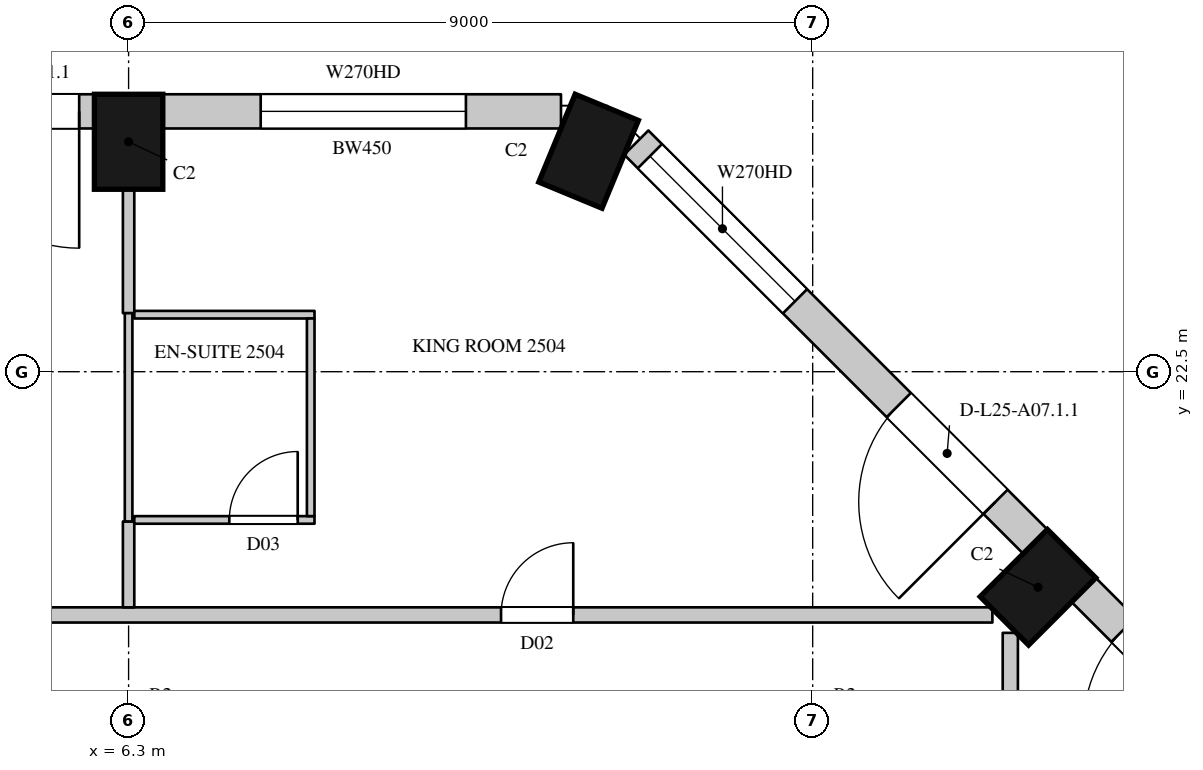
"""IFC4 building model, lengths in metres.
Left out: names, types, materials, properties, quantities, classifications, styles, units other than length and angle.
Written with IfcOpenShell. Run it as: python <this file> out.ifc"""

import sys

from ifc_helpers import new_model, si_unit, direction, frame, frame_2d, origin, origin_2d, place, context, subcontext, project, spatial, rectangle, extrude, element, fill, save


model = new_model("IFC4")
c1 = context("Model", 3, precision=1e-05, world=origin(), true_north=direction((0.0, 1.0)))
c2 = subcontext(c1, "Body", "Model", "MODEL_VIEW")
j1 = project(units=[si_unit("LENGTHUNIT", "METRE"), si_unit("PLANEANGLEUNIT", "RADIAN")], contexts=[c1])
p1 = place(None, origin())
s1 = spatial("IfcSite", under=j1, at=p1, CompositionType="ELEMENT")
p2 = place(p1, origin())
s2 = spatial("IfcBuilding", under=s1, at=p2, CompositionType="ELEMENT")
p3 = place(p2, frame((0.0, 0.0, 120.3)))
s3 = spatial("IfcBuildingStorey", under=s2, at=p3, CompositionType="ELEMENT", Elevation=120.3)
for number, where, z_axis, x_axis in (
    (1, (18.264, 19.664, 0.0), (0.0, 0.0, 1.0), (-0.707, 0.707, 0.0)),
    (2, (12.352, 25.4, 0.0), (0.0, 0.0, 1.0), (-0.924, 0.383, 0.0)),
    (3, (6.3, 25.525, 0.0), (0.0, 0.0, 1.0), (-1.0, 0.0, 0.0)),
):
    element("IfcColumn", number, at=place(p3, frame(where, z_axis=z_axis, x_axis=x_axis)), inside=s3, PredefinedType="COLUMN", context=c2, shape_type="SweptSolid", body=[
        extrude(rectangle(XDim=0.9, YDim=1.25, at=origin_2d()), origin(), (0.0, 0.0, 1.0), 3.6),
    ])
p4 = place(p3, frame((24.115, 14.379, 0.0), z_axis=(0.0, 0.0, 1.0), x_axis=(-0.707106781187, 0.707106781187, 0.0)))
e4 = element("IfcWall", 4, at=p4, inside=s3, PredefinedType="SOLIDWALL", context=c2, shape_type="SweptSolid", body=[
    extrude(rectangle(XDim=7.424, YDim=0.45, at=frame_2d((3.712, 0.0))), origin(), (0.0, 0.0, 1.0), 3.3),
])
p5 = place(p4, frame((0.253, 0.0, 1.05)))
e5 = element("IfcOpeningElement", 5, at=p5, cuts=e4, PredefinedType="OPENING", context=c2, shape_type="SweptSolid", body=[
    extrude(rectangle(XDim=2.7, YDim=2.0, at=frame_2d((1.35, 1.0))), frame((0.0, 0.235, 0.0), z_axis=(0.0, -1.0, 0.0), x_axis=(1.0, 0.0, 0.0)), (0.0, 0.0, 1.0), 0.47),
])
p6 = place(p4, frame((4.884, 0.0, 0.0)))
e6 = element("IfcOpeningElement", 6, at=p6, cuts=e4, PredefinedType="OPENING", context=c2, shape_type="SweptSolid", body=[
    extrude(rectangle(XDim=1.8, YDim=2.4, at=frame_2d((0.9, 1.2))), frame((0.0, 0.235, 0.0), z_axis=(0.0, -1.0, 0.0), x_axis=(1.0, 0.0, 0.0)), (0.0, 0.0, 1.0), 0.47),
])
p7 = place(p3, frame((18.229, 20.265, 0.0), z_axis=(0.0, 0.0, 1.0), x_axis=(-0.707106781187, 0.707106781187, 0.0)))
e7 = element("IfcWall", 7, at=p7, inside=s3, PredefinedType="SOLIDWALL", context=c2, shape_type="SweptSolid", body=[
    extrude(rectangle(XDim=7.424, YDim=0.45, at=frame_2d((3.712, 0.0))), origin(), (0.0, 0.0, 1.0), 3.3),
])
p8 = place(p7, frame((0.74, 0.0, 0.0)))
e8 = element("IfcOpeningElement", 8, at=p8, cuts=e7, PredefinedType="OPENING", context=c2, shape_type="SweptSolid", body=[
    extrude(rectangle(XDim=1.8, YDim=2.4, at=frame_2d((0.9, 1.2))), frame((0.0, 0.235, 0.0), z_axis=(0.0, -1.0, 0.0), x_axis=(1.0, 0.0, 0.0)), (0.0, 0.0, 1.0), 0.47),
])
p9 = place(p7, frame((4.471, 0.0, 1.05)))
e9 = element("IfcOpeningElement", 9, at=p9, cuts=e7, PredefinedType="OPENING", context=c2, shape_type="SweptSolid", body=[
    extrude(rectangle(XDim=2.7, YDim=2.0, at=frame_2d((1.35, 1.0))), frame((0.0, 0.235, 0.0), z_axis=(0.0, -1.0, 0.0), x_axis=(1.0, 0.0, 0.0)), (0.0, 0.0, 1.0), 0.47),
])
p10 = place(p3, frame((11.989, 25.925, 0.0), z_axis=(0.0, 0.0, 1.0), x_axis=(-1.0, 0.0, 0.0)))
e10 = element("IfcWall", 10, at=p10, inside=s3, PredefinedType="SOLIDWALL", context=c2, shape_type="SweptSolid", body=[
    extrude(rectangle(XDim=5.239, YDim=0.45, at=frame_2d((2.619, 0.0))), origin(), (0.0, 0.0, 1.0), 3.3),
])
p11 = place(p10, frame((1.251, 0.0, 1.05)))
e11 = element("IfcOpeningElement", 11, at=p11, cuts=e10, PredefinedType="OPENING", context=c2, shape_type="SweptSolid", body=[
    extrude(rectangle(XDim=2.7, YDim=2.0, at=frame_2d((1.35, 1.0))), frame((0.0, 0.235, 0.0), z_axis=(0.0, -1.0, 0.0), x_axis=(1.0, 0.0, 0.0)), (0.0, 0.0, 1.0), 0.47),
])
p12 = place(p3, frame((5.85, 25.925, 0.0), z_axis=(0.0, 0.0, 1.0), x_axis=(-1.0, 0.0, 0.0)))
e12 = element("IfcWall", 12, at=p12, inside=s3, PredefinedType="SOLIDWALL", context=c2, shape_type="SweptSolid", body=[
    extrude(rectangle(XDim=8.1, YDim=0.45, at=frame_2d((4.05, 0.0))), origin(), (0.0, 0.0, 1.0), 3.3),
])
p13 = place(p12, frame((0.2, 0.0, 0.0)))
e13 = element("IfcOpeningElement", 13, at=p13, cuts=e12, PredefinedType="OPENING", context=c2, shape_type="SweptSolid", body=[
    extrude(rectangle(XDim=1.8, YDim=2.4, at=frame_2d((0.9, 1.2))), frame((0.0, 0.235, 0.0), z_axis=(0.0, -1.0, 0.0), x_axis=(1.0, 0.0, 0.0)), (0.0, 0.0, 1.0), 0.47),
])
p14 = place(p12, frame((2.2, 0.0, 1.05)))
e14 = element("IfcOpeningElement", 14, at=p14, cuts=e12, PredefinedType="OPENING", context=c2, shape_type="SweptSolid", body=[
    extrude(rectangle(XDim=1.2, YDim=2.0, at=frame_2d((0.6, 1.0))), frame((0.0, 0.235, 0.0), z_axis=(0.0, -1.0, 0.0), x_axis=(1.0, 0.0, 0.0)), (0.0, 0.0, 1.0), 0.47),
])
p15 = place(p12, frame((4.7, 0.0, 0.0)))
e15 = element("IfcOpeningElement", 15, at=p15, cuts=e12, PredefinedType="OPENING", context=c2, shape_type="SweptSolid", body=[
    extrude(rectangle(XDim=1.8, YDim=2.4, at=frame_2d((0.9, 1.2))), frame((0.0, 0.235, 0.0), z_axis=(0.0, -1.0, 0.0), x_axis=(1.0, 0.0, 0.0)), (0.0, 0.0, 1.0), 0.47),
])
p16 = place(p12, frame((6.7, 0.0, 1.05)))
e16 = element("IfcOpeningElement", 16, at=p16, cuts=e12, PredefinedType="OPENING", context=c2, shape_type="SweptSolid", body=[
    extrude(rectangle(XDim=1.2, YDim=2.0, at=frame_2d((0.6, 1.0))), frame((0.0, 0.235, 0.0), z_axis=(0.0, -1.0, 0.0), x_axis=(1.0, 0.0, 0.0)), (0.0, 0.0, 1.0), 0.47),
])
p17 = place(p3, frame((19.937, 20.078, 0.0), z_axis=(0.0, 0.0, 1.0), x_axis=(-0.707106781187, 0.707106781187, 0.0)))
e17 = element("IfcWall", 17, at=p17, inside=s3, PredefinedType="SOLIDWALL", context=c2, shape_type="SweptSolid", body=[
    extrude(rectangle(XDim=1.781, YDim=0.45, at=frame_2d((0.89, 0.0))), origin(), (0.0, 0.0, 1.0), 0.6),
])
p18 = place(p3, frame((16.486, 23.529, 0.0), z_axis=(0.0, 0.0, 1.0), x_axis=(-0.707022305137, 0.707191247145, 0.0)))
e18 = element("IfcWall", 18, at=p18, inside=s3, PredefinedType="SOLIDWALL", context=c2, shape_type="SweptSolid", body=[
    extrude(rectangle(XDim=1.445, YDim=0.45, at=frame_2d((0.723, 0.0))), origin(), (0.0, 0.0, 1.0), 0.6),
])
p19 = place(p3, frame((-20.8, 19.3, 0.0), z_axis=(0.0, 0.0, 1.0), x_axis=(1.0, 0.0, 0.0)))
e19 = element("IfcWall", 19, at=p19, inside=s3, PredefinedType="PARTITIONING", context=c2, shape_type="SweptSolid", body=[
    extrude(rectangle(XDim=38.464, YDim=0.2, at=frame_2d((19.232, 0.0))), origin(), (0.0, 0.0, 1.0), 3.3),
])
p20 = place(p19, frame((24.05, 0.0, 0.0)))
e20 = element("IfcOpeningElement", 20, at=p20, cuts=e19, PredefinedType="OPENING", context=c2, shape_type="SweptSolid", body=[
    extrude(rectangle(XDim=0.9, YDim=2.2, at=frame_2d((0.45, 1.1))), frame((0.0, 0.11, 0.0), z_axis=(0.0, -1.0, 0.0), x_axis=(1.0, 0.0, 0.0)), (0.0, 0.0, 1.0), 0.22),
])
p21 = place(p19, frame((11.2, 0.0, 0.0)))
e21 = element("IfcOpeningElement", 21, at=p21, cuts=e19, PredefinedType="OPENING", context=c2, shape_type="SweptSolid", body=[
    extrude(rectangle(XDim=0.95, YDim=2.2, at=frame_2d((0.475, 1.1))), frame((0.0, 0.11, 0.0), z_axis=(0.0, -1.0, 0.0), x_axis=(1.0, 0.0, 0.0)), (0.0, 0.0, 1.0), 0.22),
])
p22 = place(p19, frame((15.05, 0.0, 0.0)))
e22 = element("IfcOpeningElement", 22, at=p22, cuts=e19, PredefinedType="OPENING", context=c2, shape_type="SweptSolid", body=[
    extrude(rectangle(XDim=0.95, YDim=2.2, at=frame_2d((0.475, 1.1))), frame((0.0, 0.11, 0.0), z_axis=(0.0, -1.0, 0.0), x_axis=(1.0, 0.0, 0.0)), (0.0, 0.0, 1.0), 0.22),
])
p23 = place(p19, frame((32.0, 0.0, 0.0)))
e23 = element("IfcOpeningElement", 23, at=p23, cuts=e19, PredefinedType="OPENING", context=c2, shape_type="SweptSolid", body=[
    extrude(rectangle(XDim=0.95, YDim=2.2, at=frame_2d((0.475, 1.1))), frame((0.0, 0.11, 0.0), z_axis=(0.0, -1.0, 0.0), x_axis=(1.0, 0.0, 0.0)), (0.0, 0.0, 1.0), 0.22),
])
p24 = place(p3, frame((17.9, 4.75, 0.0), z_axis=(0.0, 0.0, 1.0), x_axis=(0.0, 1.0, 0.0)))
e24 = element("IfcWall", 24, at=p24, inside=s3, PredefinedType="PARTITIONING", context=c2, shape_type="SweptSolid", body=[
    extrude(rectangle(XDim=14.314, YDim=0.2, at=frame_2d((7.157, 0.0))), origin(), (0.0, 0.0, 1.0), 3.3),
])
p25 = place(p24, frame((1.7, 0.0, 0.0)))
e25 = element("IfcOpeningElement", 25, at=p25, cuts=e24, PredefinedType="OPENING", context=c2, shape_type="SweptSolid", body=[
    extrude(rectangle(XDim=0.9, YDim=2.2, at=frame_2d((0.45, 1.1))), frame((0.0, 0.11, 0.0), z_axis=(0.0, -1.0, 0.0), x_axis=(1.0, 0.0, 0.0)), (0.0, 0.0, 1.0), 0.22),
])
p26 = place(p24, frame((10.2, 0.0, 0.0)))
e26 = element("IfcOpeningElement", 26, at=p26, cuts=e24, PredefinedType="OPENING", context=c2, shape_type="SweptSolid", body=[
    extrude(rectangle(XDim=0.95, YDim=2.2, at=frame_2d((0.475, 1.1))), frame((0.0, 0.11, 0.0), z_axis=(0.0, -1.0, 0.0), x_axis=(1.0, 0.0, 0.0)), (0.0, 0.0, 1.0), 0.22),
])
p27 = place(p3, frame((6.3, 19.4, 0.0), z_axis=(0.0, 0.0, 1.0), x_axis=(0.0, 1.0, 0.0)))
e27 = element("IfcWall", 27, at=p27, inside=s3, PredefinedType="PARTITIONING", context=c2, shape_type="SweptSolid", body=[
    extrude(rectangle(XDim=1.13, YDim=0.15, at=frame_2d((0.565, 0.0))), origin(), (0.0, 0.0, 1.0), 2.75),
])
p28 = place(p3, frame((6.3, 23.27, 0.0), z_axis=(0.0, 0.0, 1.0), x_axis=(0.0, 1.0, 0.0)))
e28 = element("IfcWall", 28, at=p28, inside=s3, PredefinedType="PARTITIONING", context=c2, shape_type="SweptSolid", body=[
    extrude(rectangle(XDim=1.63, YDim=0.15, at=frame_2d((0.815, 0.0))), origin(), (0.0, 0.0, 1.0), 2.75),
])
p29 = place(p3, frame((6.3, 20.53, 0.0), z_axis=(0.0, 0.0, 1.0), x_axis=(0.0, 1.0, 0.0)))
e29 = element("IfcWall", 29, at=p29, inside=s3, PredefinedType="PARTITIONING", context=c2, shape_type="SweptSolid", body=[
    extrude(rectangle(XDim=2.74, YDim=0.1, at=frame_2d((1.37, 0.0))), origin(), (0.0, 0.0, 1.0), 2.75),
])
p30 = place(p3, frame((6.375, 20.55, 0.0), z_axis=(0.0, 0.0, 1.0), x_axis=(1.0, 0.0, 0.0)))
e30 = element("IfcWall", 30, at=p30, inside=s3, PredefinedType="PARTITIONING", context=c2, shape_type="SweptSolid", body=[
    extrude(rectangle(XDim=2.371, YDim=0.1, at=frame_2d((1.186, 0.0))), origin(), (0.0, 0.0, 1.0), 3.3),
])
p31 = place(p30, frame((1.25, 0.0, 0.0)))
e31 = element("IfcOpeningElement", 31, at=p31, cuts=e30, PredefinedType="OPENING", context=c2, shape_type="SweptSolid", body=[
    extrude(rectangle(XDim=0.9, YDim=2.2, at=frame_2d((0.45, 1.1))), frame((0.0, 0.06, 0.0), z_axis=(0.0, -1.0, 0.0), x_axis=(1.0, 0.0, 0.0)), (0.0, 0.0, 1.0), 0.12),
])
p32 = place(p3, frame((6.375, 23.25, 0.0), z_axis=(0.0, 0.0, 1.0), x_axis=(1.0, 0.0, 0.0)))
e32 = element("IfcWall", 32, at=p32, inside=s3, PredefinedType="PARTITIONING", context=c2, shape_type="SweptSolid", body=[
    extrude(rectangle(XDim=2.371, YDim=0.1, at=frame_2d((1.186, 0.0))), origin(), (0.0, 0.0, 1.0), 3.3),
])
p33 = place(p3, frame((8.696, 20.6, 0.0), z_axis=(0.0, 0.0, 1.0), x_axis=(0.0, 1.0, 0.0)))
e33 = element("IfcWall", 33, at=p33, inside=s3, PredefinedType="PARTITIONING", context=c2, shape_type="SweptSolid", body=[
    extrude(rectangle(XDim=2.6, YDim=0.1, at=frame_2d((1.3, 0.0))), origin(), (0.0, 0.0, 1.0), 3.3),
])
p34 = place(p6, origin())
e34 = element("IfcDoor", 34, at=p34, inside=s3, OperationType="SLIDING_TO_LEFT", PredefinedType="DOOR", context=c2, shape_type="SweptSolid", body=[
    extrude(rectangle(XDim=1.8, YDim=2.4, at=frame_2d((0.9, 1.2))), frame((0.0, 0.13, 0.0), z_axis=(0.0, -1.0, 0.0), x_axis=(1.0, 0.0, 0.0)), (0.0, 0.0, 1.0), 0.05),
])
fill(e6, e34)
p35 = place(p8, origin())
e35 = element("IfcDoor", 35, at=p35, inside=s3, OperationType="SLIDING_TO_LEFT", PredefinedType="DOOR", context=c2, shape_type="SweptSolid", body=[
    extrude(rectangle(XDim=1.8, YDim=2.4, at=frame_2d((0.9, 1.2))), frame((0.0, 0.13, 0.0), z_axis=(0.0, -1.0, 0.0), x_axis=(1.0, 0.0, 0.0)), (0.0, 0.0, 1.0), 0.05),
])
fill(e8, e35)
p36 = place(p9, origin())
e36 = element("IfcWindow", 36, at=p36, inside=s3, PartitioningType="SINGLE_PANEL", PredefinedType="WINDOW", context=c2, shape_type="SweptSolid", body=[
    extrude(rectangle(XDim=2.7, YDim=2.0, at=frame_2d((1.35, 1.0))), frame((0.0, 0.135, 0.0), z_axis=(0.0, -1.0, 0.0), x_axis=(1.0, 0.0, 0.0)), (0.0, 0.0, 1.0), 0.06),
])
fill(e9, e36)
p37 = place(p11, origin())
e37 = element("IfcWindow", 37, at=p37, inside=s3, PartitioningType="SINGLE_PANEL", PredefinedType="WINDOW", context=c2, shape_type="SweptSolid", body=[
    extrude(rectangle(XDim=2.7, YDim=2.0, at=frame_2d((1.35, 1.0))), frame((0.0, 0.135, 0.0), z_axis=(0.0, -1.0, 0.0), x_axis=(1.0, 0.0, 0.0)), (0.0, 0.0, 1.0), 0.06),
])
fill(e11, e37)
p38 = place(p13, origin())
e38 = element("IfcDoor", 38, at=p38, inside=s3, OperationType="SLIDING_TO_LEFT", PredefinedType="DOOR", context=c2, shape_type="SweptSolid", body=[
    extrude(rectangle(XDim=1.8, YDim=2.4, at=frame_2d((0.9, 1.2))), frame((0.0, 0.13, 0.0), z_axis=(0.0, -1.0, 0.0), x_axis=(1.0, 0.0, 0.0)), (0.0, 0.0, 1.0), 0.05),
])
fill(e13, e38)
p39 = place(p23, origin())
e39 = element("IfcDoor", 39, at=p39, inside=s3, OperationType="SINGLE_SWING_RIGHT", PredefinedType="DOOR", context=c2, shape_type="SweptSolid", body=[
    extrude(rectangle(XDim=0.95, YDim=2.2, at=frame_2d((0.475, 1.1))), frame((0.0, 0.025, 0.0), z_axis=(0.0, -1.0, 0.0), x_axis=(1.0, 0.0, 0.0)), (0.0, 0.0, 1.0), 0.05),
])
fill(e23, e39)
p40 = place(p31, origin())
e40 = element("IfcDoor", 40, at=p40, inside=s3, OperationType="SINGLE_SWING_RIGHT", PredefinedType="DOOR", context=c2, shape_type="SweptSolid", body=[
    extrude(rectangle(XDim=0.9, YDim=2.2, at=frame_2d((0.45, 1.1))), frame((0.0, 0.025, 0.0), z_axis=(0.0, -1.0, 0.0), x_axis=(1.0, 0.0, 0.0)), (0.0, 0.0, 1.0), 0.05),
])
fill(e31, e40)
save(model, sys.argv[1])
